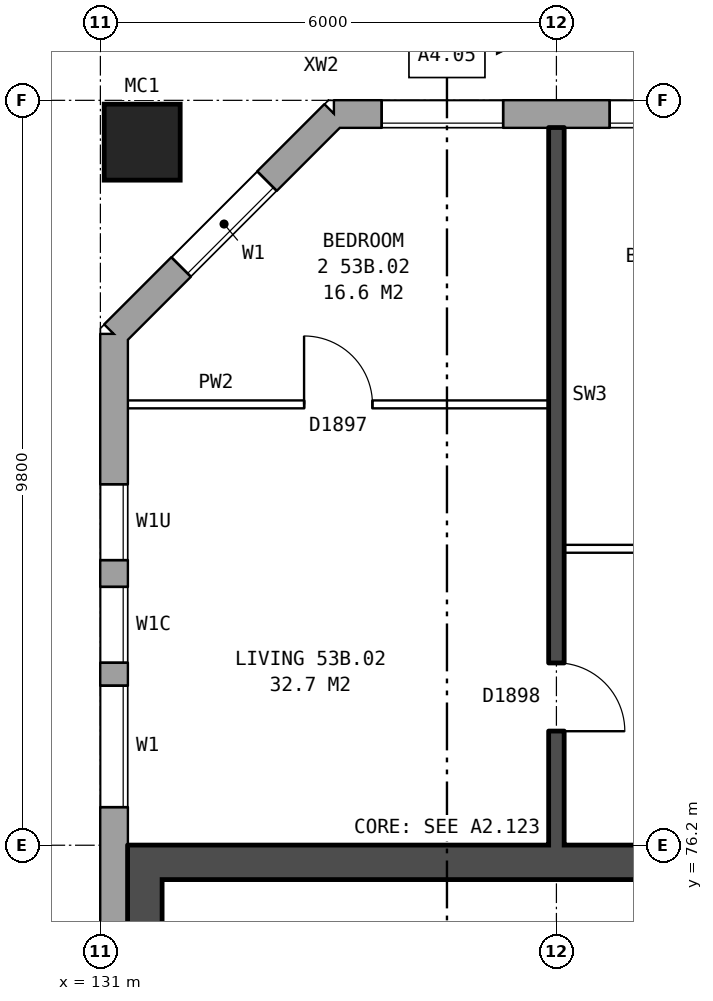
"""IFC4 building model, lengths in metres.
Left out: names, types, materials, properties, quantities, classifications, styles, units other than length and angle.
Written with IfcOpenShell. Run it as: python <this file> out.ifc"""

import sys

from ifc_helpers import new_model, si_unit, direction, frame, frame_2d, origin, origin_2d, place, context, subcontext, project, spatial, rectangle, hollow_rectangle, extrude, element, fill, save


model = new_model("IFC4")
c1 = context("Model", 3, precision=1e-05, world=origin(), true_north=direction((0.0, 1.0)))
c2 = subcontext(c1, "Body", "Model", "MODEL_VIEW")
j1 = project(units=[si_unit("LENGTHUNIT", "METRE"), si_unit("PLANEANGLEUNIT", "RADIAN")], contexts=[c1])
p1 = place(None, origin())
s1 = spatial("IfcSite", under=j1, at=p1, CompositionType="ELEMENT")
p2 = place(p1, origin())
s2 = spatial("IfcBuilding", under=s1, at=p2, CompositionType="ELEMENT")
p3 = place(p2, frame((0.0, 0.0, 188.2)))
s3 = spatial("IfcBuildingStorey", under=s2, at=p3, CompositionType="ELEMENT", Elevation=188.2)
p4 = place(p3, frame((131.55, 85.45, 0.0), z_axis=(0.0, 0.0, 1.0), x_axis=(1.0, 0.0, 0.0)))
e1 = element("IfcColumn", 1, at=p4, inside=s3, PredefinedType="COLUMN", context=c2, shape_type="SweptSolid", body=[
    extrude(hollow_rectangle(XDim=1.0, YDim=1.0, WallThickness=0.055, at=origin_2d()), origin(), (0.0, 0.0, 1.0), 3.1),
])
p5 = place(p3, frame((167.175, 85.82, 0.0), z_axis=(0.0, 0.0, 1.0), x_axis=(-1.0, 0.0, 0.0)))
e2 = element("IfcWall", 2, at=p5, inside=s3, PredefinedType="STANDARD", context=c2, shape_type="SweptSolid", body=[
    extrude(rectangle(XDim=33.101, YDim=0.36, at=frame_2d((16.55, 0.0))), origin(), (0.0, 0.0, 1.0), 2.85),
])
p6 = place(p5, frame((0.875, 0.0, 0.8)))
e3 = element("IfcOpeningElement", 3, at=p6, cuts=e2, PredefinedType="OPENING", context=c2, shape_type="SweptSolid", body=[
    extrude(rectangle(XDim=1.6, YDim=1.8, at=frame_2d((0.8, 0.9))), frame((0.0, 0.19, 0.0), z_axis=(0.0, -1.0, 0.0), x_axis=(1.0, 0.0, 0.0)), (0.0, 0.0, 1.0), 0.38),
])
p7 = place(p5, frame((3.875, 0.0, 0.8)))
e4 = element("IfcOpeningElement", 4, at=p7, cuts=e2, PredefinedType="OPENING", context=c2, shape_type="SweptSolid", body=[
    extrude(rectangle(XDim=1.6, YDim=1.8, at=frame_2d((0.8, 0.9))), frame((0.0, 0.19, 0.0), z_axis=(0.0, -1.0, 0.0), x_axis=(1.0, 0.0, 0.0)), (0.0, 0.0, 1.0), 0.38),
])
p8 = place(p5, frame((6.875, 0.0, 0.8)))
e5 = element("IfcOpeningElement", 5, at=p8, cuts=e2, PredefinedType="OPENING", context=c2, shape_type="SweptSolid", body=[
    extrude(rectangle(XDim=1.6, YDim=1.8, at=frame_2d((0.8, 0.9))), frame((0.0, 0.19, 0.0), z_axis=(0.0, -1.0, 0.0), x_axis=(1.0, 0.0, 0.0)), (0.0, 0.0, 1.0), 0.38),
])
p9 = place(p5, frame((9.875, 0.0, 0.8)))
e6 = element("IfcOpeningElement", 6, at=p9, cuts=e2, PredefinedType="OPENING", context=c2, shape_type="SweptSolid", body=[
    extrude(rectangle(XDim=1.6, YDim=1.8, at=frame_2d((0.8, 0.9))), frame((0.0, 0.19, 0.0), z_axis=(0.0, -1.0, 0.0), x_axis=(1.0, 0.0, 0.0)), (0.0, 0.0, 1.0), 0.38),
])
p10 = place(p5, frame((12.975, 0.0, 0.15)))
e7 = element("IfcOpeningElement", 7, at=p10, cuts=e2, PredefinedType="OPENING", context=c2, shape_type="SweptSolid", body=[
    extrude(rectangle(XDim=0.6, YDim=0.9, at=frame_2d((0.3, 0.45))), frame((0.0, 0.19, 0.0), z_axis=(0.0, -1.0, 0.0), x_axis=(1.0, 0.0, 0.0)), (0.0, 0.0, 1.0), 0.38),
])
p11 = place(p5, frame((15.875, 0.0, 0.8)))
e8 = element("IfcOpeningElement", 8, at=p11, cuts=e2, PredefinedType="OPENING", context=c2, shape_type="SweptSolid", body=[
    extrude(rectangle(XDim=1.6, YDim=1.8, at=frame_2d((0.8, 0.9))), frame((0.0, 0.19, 0.0), z_axis=(0.0, -1.0, 0.0), x_axis=(1.0, 0.0, 0.0)), (0.0, 0.0, 1.0), 0.38),
])
p12 = place(p5, frame((18.375, 0.0, 0.35)))
e9 = element("IfcOpeningElement", 9, at=p12, cuts=e2, PredefinedType="OPENING", context=c2, shape_type="SweptSolid", body=[
    extrude(rectangle(XDim=0.8, YDim=1.8, at=frame_2d((0.4, 0.9))), frame((0.0, 0.19, 0.0), z_axis=(0.0, -1.0, 0.0), x_axis=(1.0, 0.0, 0.0)), (0.0, 0.0, 1.0), 0.38),
])
p13 = place(p5, frame((21.875, 0.0, 0.8)))
e10 = element("IfcOpeningElement", 10, at=p13, cuts=e2, PredefinedType="OPENING", context=c2, shape_type="SweptSolid", body=[
    extrude(rectangle(XDim=1.6, YDim=1.8, at=frame_2d((0.8, 0.9))), frame((0.0, 0.19, 0.0), z_axis=(0.0, -1.0, 0.0), x_axis=(1.0, 0.0, 0.0)), (0.0, 0.0, 1.0), 0.38),
])
p14 = place(p5, frame((24.875, 0.0, 0.8)))
e11 = element("IfcOpeningElement", 11, at=p14, cuts=e2, PredefinedType="OPENING", context=c2, shape_type="SweptSolid", body=[
    extrude(rectangle(XDim=1.6, YDim=1.8, at=frame_2d((0.8, 0.9))), frame((0.0, 0.19, 0.0), z_axis=(0.0, -1.0, 0.0), x_axis=(1.0, 0.0, 0.0)), (0.0, 0.0, 1.0), 0.38),
])
p15 = place(p5, frame((27.875, 0.0, 0.8)))
e12 = element("IfcOpeningElement", 12, at=p15, cuts=e2, PredefinedType="OPENING", context=c2, shape_type="SweptSolid", body=[
    extrude(rectangle(XDim=1.6, YDim=1.8, at=frame_2d((0.8, 0.9))), frame((0.0, 0.19, 0.0), z_axis=(0.0, -1.0, 0.0), x_axis=(1.0, 0.0, 0.0)), (0.0, 0.0, 1.0), 0.38),
])
p16 = place(p5, frame((30.875, 0.0, 0.8)))
e13 = element("IfcOpeningElement", 13, at=p16, cuts=e2, PredefinedType="OPENING", context=c2, shape_type="SweptSolid", body=[
    extrude(rectangle(XDim=1.6, YDim=1.8, at=frame_2d((0.8, 0.9))), frame((0.0, 0.19, 0.0), z_axis=(0.0, -1.0, 0.0), x_axis=(1.0, 0.0, 0.0)), (0.0, 0.0, 1.0), 0.38),
])
p17 = place(p5, frame((13.875, 0.0, 0.25)))
e14 = element("IfcOpeningElement", 14, at=p17, cuts=e2, PredefinedType="OPENING", context=c2, shape_type="SweptSolid", body=[
    extrude(rectangle(XDim=1.0, YDim=1.8, at=frame_2d((0.5, 0.9))), frame((0.0, 0.19, 0.0), z_axis=(0.0, -1.0, 0.0), x_axis=(1.0, 0.0, 0.0)), (0.0, 0.0, 1.0), 0.38),
])
p18 = place(p5, frame((19.475, 0.0, 0.15)))
e15 = element("IfcOpeningElement", 15, at=p18, cuts=e2, PredefinedType="OPENING", context=c2, shape_type="SweptSolid", body=[
    extrude(rectangle(XDim=0.6, YDim=0.9, at=frame_2d((0.3, 0.45))), frame((0.0, 0.19, 0.0), z_axis=(0.0, -1.0, 0.0), x_axis=(1.0, 0.0, 0.0)), (0.0, 0.0, 1.0), 0.38),
])
p19 = place(p3, frame((134.075, 85.82, 0.0), z_axis=(0.0, 0.0, 1.0), x_axis=(-0.707106781187, -0.707106781187, 0.0)))
e16 = element("IfcWall", 16, at=p19, inside=s3, PredefinedType="STANDARD", context=c2, shape_type="SweptSolid", body=[
    extrude(rectangle(XDim=4.094, YDim=0.36, at=frame_2d((2.047, 0.0))), origin(), (0.0, 0.0, 1.0), 2.85),
])
p20 = place(p19, frame((1.247, 0.0, 0.8)))
e17 = element("IfcOpeningElement", 17, at=p20, cuts=e16, PredefinedType="OPENING", context=c2, shape_type="SweptSolid", body=[
    extrude(rectangle(XDim=1.6, YDim=1.8, at=frame_2d((0.8, 0.9))), frame((0.0, 0.19, 0.0), z_axis=(0.0, -1.0, 0.0), x_axis=(1.0, 0.0, 0.0)), (0.0, 0.0, 1.0), 0.38),
])
p21 = place(p3, frame((131.18, 82.925, 0.0), z_axis=(0.0, 0.0, 1.0), x_axis=(0.0, -1.0, 0.0)))
e18 = element("IfcWall", 18, at=p21, inside=s3, PredefinedType="STANDARD", context=c2, shape_type="SweptSolid", body=[
    extrude(rectangle(XDim=25.851, YDim=0.36, at=frame_2d((12.925, 0.0))), origin(), (0.0, 0.0, 1.0), 2.85),
])
p22 = place(p21, frame((1.975, 0.0, 1.7)))
e19 = element("IfcOpeningElement", 19, at=p22, cuts=e18, PredefinedType="OPENING", context=c2, shape_type="SweptSolid", body=[
    extrude(rectangle(XDim=1.0, YDim=0.9, at=frame_2d((0.5, 0.45))), frame((0.0, 0.19, 0.0), z_axis=(0.0, -1.0, 0.0), x_axis=(1.0, 0.0, 0.0)), (0.0, 0.0, 1.0), 0.38),
])
p23 = place(p21, frame((4.625, 0.0, 0.8)))
e20 = element("IfcOpeningElement", 20, at=p23, cuts=e18, PredefinedType="OPENING", context=c2, shape_type="SweptSolid", body=[
    extrude(rectangle(XDim=1.6, YDim=1.8, at=frame_2d((0.8, 0.9))), frame((0.0, 0.19, 0.0), z_axis=(0.0, -1.0, 0.0), x_axis=(1.0, 0.0, 0.0)), (0.0, 0.0, 1.0), 0.38),
])
p24 = place(p21, frame((19.625, 0.0, 0.8)))
e21 = element("IfcOpeningElement", 21, at=p24, cuts=e18, PredefinedType="OPENING", context=c2, shape_type="SweptSolid", body=[
    extrude(rectangle(XDim=1.6, YDim=1.8, at=frame_2d((0.8, 0.9))), frame((0.0, 0.19, 0.0), z_axis=(0.0, -1.0, 0.0), x_axis=(1.0, 0.0, 0.0)), (0.0, 0.0, 1.0), 0.38),
])
p25 = place(p21, frame((21.55, 0.0, 1.1)))
e22 = element("IfcOpeningElement", 22, at=p25, cuts=e18, PredefinedType="OPENING", context=c2, shape_type="SweptSolid", body=[
    extrude(rectangle(XDim=1.4, YDim=1.5, at=frame_2d((0.7, 0.75))), frame((0.0, 0.19, 0.0), z_axis=(0.0, -1.0, 0.0), x_axis=(1.0, 0.0, 0.0)), (0.0, 0.0, 1.0), 0.38),
])
p26 = place(p21, frame((3.325, 0.0, 0.8)))
e23 = element("IfcOpeningElement", 23, at=p26, cuts=e18, PredefinedType="OPENING", context=c2, shape_type="SweptSolid", body=[
    extrude(rectangle(XDim=1.0, YDim=1.8, at=frame_2d((0.5, 0.9))), frame((0.0, 0.19, 0.0), z_axis=(0.0, -1.0, 0.0), x_axis=(1.0, 0.0, 0.0)), (0.0, 0.0, 1.0), 0.38),
])
p27 = place(p21, frame((23.25, 0.0, 1.7)))
e24 = element("IfcOpeningElement", 24, at=p27, cuts=e18, PredefinedType="OPENING", context=c2, shape_type="SweptSolid", body=[
    extrude(rectangle(XDim=0.6, YDim=0.9, at=frame_2d((0.3, 0.45))), frame((0.0, 0.19, 0.0), z_axis=(0.0, -1.0, 0.0), x_axis=(1.0, 0.0, 0.0)), (0.0, 0.0, 1.0), 0.38),
])
p28 = place(p3, frame((131.585, 63.8, 0.0), z_axis=(0.0, 0.0, 1.0), x_axis=(0.0, 1.0, 0.0)))
e25 = element("IfcWall", 25, at=p28, inside=s3, PredefinedType="SHEAR", context=c2, shape_type="SweptSolid", body=[
    extrude(rectangle(XDim=12.4, YDim=0.45, at=frame_2d((6.2, 0.0))), origin(), (0.0, 0.0, 1.0), 2.85),
])
p29 = place(p3, frame((139.31, 75.975, 0.0), z_axis=(0.0, 0.0, 1.0), x_axis=(-1.0, 0.0, 0.0)))
e26 = element("IfcWall", 26, at=p29, inside=s3, PredefinedType="SHEAR", context=c2, shape_type="SweptSolid", body=[
    extrude(rectangle(XDim=7.5, YDim=0.45, at=frame_2d((3.75, 0.0))), origin(), (0.0, 0.0, 1.0), 2.85),
])
p30 = place(p3, frame((137.1, 80.1, 0.0), z_axis=(0.0, 0.0, 1.0), x_axis=(1.0, 0.0, 0.0)))
e27 = element("IfcWall", 27, at=p30, inside=s3, PredefinedType="PARTITIONING", context=c2, shape_type="SweptSolid", body=[
    extrude(rectangle(XDim=5.8, YDim=0.1, at=frame_2d((2.9, 0.0))), origin(), (0.0, 0.0, 1.0), 2.85),
])
p31 = place(p30, frame((1.3, 0.0, 0.0)))
e28 = element("IfcOpeningElement", 28, at=p31, cuts=e27, PredefinedType="OPENING", context=c2, shape_type="SweptSolid", body=[
    extrude(rectangle(XDim=0.9, YDim=2.1, at=frame_2d((0.45, 1.05))), frame((0.0, 0.06, 0.0), z_axis=(0.0, -1.0, 0.0), x_axis=(1.0, 0.0, 0.0)), (0.0, 0.0, 1.0), 0.12),
])
p32 = place(p30, frame((4.2, 0.0, 0.0)))
e29 = element("IfcOpeningElement", 29, at=p32, cuts=e27, PredefinedType="OPENING", context=c2, shape_type="SweptSolid", body=[
    extrude(rectangle(XDim=0.9, YDim=2.1, at=frame_2d((0.45, 1.05))), frame((0.0, 0.06, 0.0), z_axis=(0.0, -1.0, 0.0), x_axis=(1.0, 0.0, 0.0)), (0.0, 0.0, 1.0), 0.12),
])
p33 = place(p3, frame((131.36, 82.0, 0.0), z_axis=(0.0, 0.0, 1.0), x_axis=(1.0, 0.0, 0.0)))
e30 = element("IfcWall", 30, at=p33, inside=s3, PredefinedType="PARTITIONING", context=c2, shape_type="SweptSolid", body=[
    extrude(rectangle(XDim=5.54, YDim=0.1, at=frame_2d((2.77, 0.0))), origin(), (0.0, 0.0, 1.0), 2.85),
])
p34 = place(p33, frame((2.32, 0.0, 0.0)))
e31 = element("IfcOpeningElement", 31, at=p34, cuts=e30, PredefinedType="OPENING", context=c2, shape_type="SweptSolid", body=[
    extrude(rectangle(XDim=0.9, YDim=2.1, at=frame_2d((0.45, 1.05))), frame((0.0, 0.06, 0.0), z_axis=(0.0, -1.0, 0.0), x_axis=(1.0, 0.0, 0.0)), (0.0, 0.0, 1.0), 0.12),
])
p35 = place(p3, frame((137.0, 76.2, 0.0), z_axis=(0.0, 0.0, 1.0), x_axis=(0.0, 1.0, 0.0)))
e32 = element("IfcWall", 32, at=p35, inside=s3, PredefinedType="SOLIDWALL", context=c2, shape_type="SweptSolid", body=[
    extrude(rectangle(XDim=9.44, YDim=0.2, at=frame_2d((4.72, 0.0))), origin(), (0.0, 0.0, 1.0), 2.85),
])
p36 = place(p35, frame((1.5, 0.0, 0.0)))
e33 = element("IfcOpeningElement", 33, at=p36, cuts=e32, PredefinedType="OPENING", context=c2, shape_type="SweptSolid", body=[
    extrude(rectangle(XDim=0.9, YDim=2.1, at=frame_2d((0.45, 1.05))), frame((0.0, 0.11, 0.0), z_axis=(0.0, -1.0, 0.0), x_axis=(1.0, 0.0, 0.0)), (0.0, 0.0, 1.0), 0.22),
])
p37 = place(p15, origin())
e34 = element("IfcWindow", 34, at=p37, inside=s3, PartitioningType="SINGLE_PANEL", PredefinedType="WINDOW", context=c2, shape_type="SweptSolid", body=[
    extrude(rectangle(XDim=1.6, YDim=1.8, at=frame_2d((0.8, 0.9))), frame((0.0, 0.15, 0.0), z_axis=(0.0, -1.0, 0.0), x_axis=(1.0, 0.0, 0.0)), (0.0, 0.0, 1.0), 0.06),
])
fill(e12, e34)
p38 = place(p16, origin())
e35 = element("IfcWindow", 35, at=p38, inside=s3, PartitioningType="SINGLE_PANEL", PredefinedType="WINDOW", context=c2, shape_type="SweptSolid", body=[
    extrude(rectangle(XDim=1.6, YDim=1.8, at=frame_2d((0.8, 0.9))), frame((0.0, 0.15, 0.0), z_axis=(0.0, -1.0, 0.0), x_axis=(1.0, 0.0, 0.0)), (0.0, 0.0, 1.0), 0.06),
])
fill(e13, e35)
p39 = place(p20, origin())
e36 = element("IfcWindow", 36, at=p39, inside=s3, PartitioningType="SINGLE_PANEL", PredefinedType="WINDOW", context=c2, shape_type="SweptSolid", body=[
    extrude(rectangle(XDim=1.6, YDim=1.8, at=frame_2d((0.8, 0.9))), frame((0.0, 0.15, 0.0), z_axis=(0.0, -1.0, 0.0), x_axis=(1.0, 0.0, 0.0)), (0.0, 0.0, 1.0), 0.06),
])
fill(e17, e36)
p40 = place(p22, origin())
e37 = element("IfcWindow", 37, at=p40, inside=s3, PartitioningType="SINGLE_PANEL", PredefinedType="WINDOW", context=c2, shape_type="SweptSolid", body=[
    extrude(rectangle(XDim=1.0, YDim=0.9, at=frame_2d((0.5, 0.45))), frame((0.0, 0.15, 0.0), z_axis=(0.0, -1.0, 0.0), x_axis=(1.0, 0.0, 0.0)), (0.0, 0.0, 1.0), 0.06),
])
fill(e19, e37)
p41 = place(p23, origin())
e38 = element("IfcWindow", 38, at=p41, inside=s3, PartitioningType="SINGLE_PANEL", PredefinedType="WINDOW", context=c2, shape_type="SweptSolid", body=[
    extrude(rectangle(XDim=1.6, YDim=1.8, at=frame_2d((0.8, 0.9))), frame((0.0, 0.15, 0.0), z_axis=(0.0, -1.0, 0.0), x_axis=(1.0, 0.0, 0.0)), (0.0, 0.0, 1.0), 0.06),
])
fill(e20, e38)
p42 = place(p34, origin())
e39 = element("IfcDoor", 39, at=p42, inside=s3, OperationType="SINGLE_SWING_LEFT", PredefinedType="DOOR", context=c2, shape_type="SweptSolid", body=[
    extrude(rectangle(XDim=0.9, YDim=2.1, at=frame_2d((0.45, 1.05))), frame((0.0, 0.025, 0.0), z_axis=(0.0, -1.0, 0.0), x_axis=(1.0, 0.0, 0.0)), (0.0, 0.0, 1.0), 0.05),
])
fill(e31, e39)
p43 = place(p36, frame((0.9, 0.0, 0.0), z_axis=(0.0, 0.0, 1.0), x_axis=(-1.0, 0.0, 0.0)))
e40 = element("IfcDoor", 40, at=p43, inside=s3, OperationType="SINGLE_SWING_RIGHT", PredefinedType="DOOR", context=c2, shape_type="SweptSolid", body=[
    extrude(rectangle(XDim=0.9, YDim=2.1, at=frame_2d((0.45, 1.05))), frame((0.0, 0.025, 0.0), z_axis=(0.0, -1.0, 0.0), x_axis=(1.0, 0.0, 0.0)), (0.0, 0.0, 1.0), 0.05),
])
fill(e33, e40)
p44 = place(p26, origin())
e41 = element("IfcWindow", 41, at=p44, inside=s3, PartitioningType="SINGLE_PANEL", PredefinedType="WINDOW", context=c2, shape_type="SweptSolid", body=[
    extrude(rectangle(XDim=1.0, YDim=1.8, at=frame_2d((0.5, 0.9))), frame((0.0, 0.15, 0.0), z_axis=(0.0, -1.0, 0.0), x_axis=(1.0, 0.0, 0.0)), (0.0, 0.0, 1.0), 0.06),
])
fill(e23, e41)
save(model, sys.argv[1])
